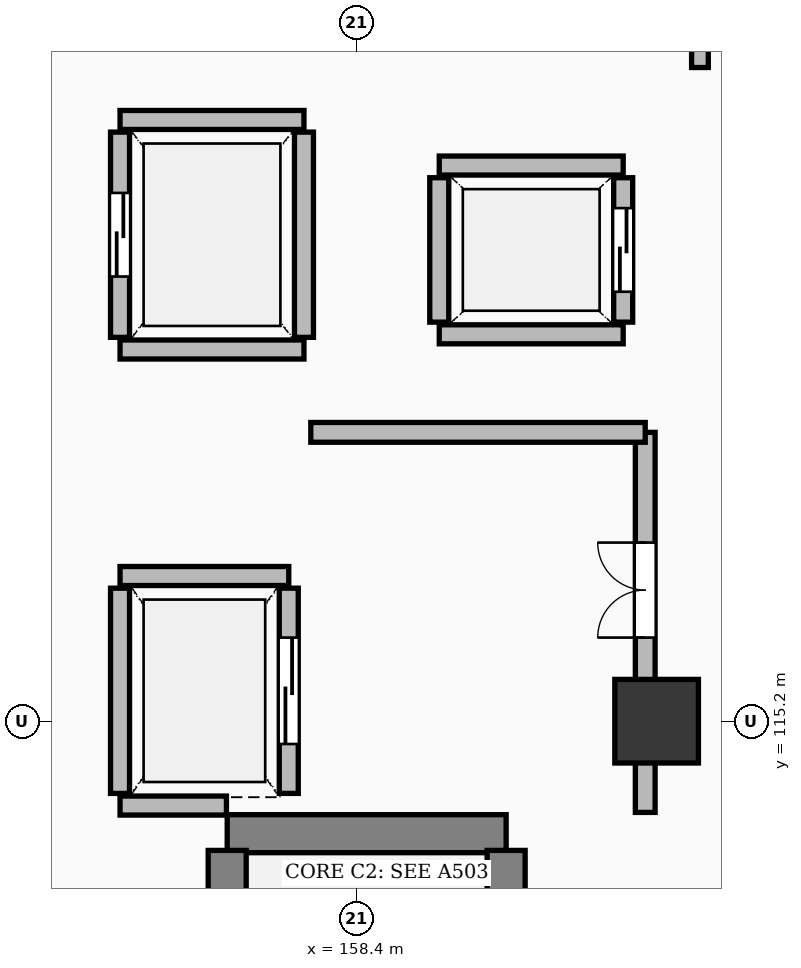
"""IFC4 building model, lengths in metres.
Left out: names, types, materials, properties, quantities, classifications, styles, units other than length and angle.
Written with IfcOpenShell. Run it as: python <this file> out.ifc"""

import sys

from ifc_helpers import new_model, si_unit, direction, frame, frame_2d, origin, origin_2d, place, context, subcontext, project, spatial, rectangle, extrude, element, fill, save


model = new_model("IFC4")
c1 = context("Model", 3, precision=1e-05, world=origin(), true_north=direction((0.0, 1.0)))
c2 = subcontext(c1, "Body", "Model", "MODEL_VIEW")
j1 = project(units=[si_unit("LENGTHUNIT", "METRE"), si_unit("PLANEANGLEUNIT", "RADIAN")], contexts=[c1])
p1 = place(None, origin())
s1 = spatial("IfcSite", under=j1, at=p1, CompositionType="ELEMENT")
p2 = place(p1, origin())
s2 = spatial("IfcBuilding", under=s1, at=p2, CompositionType="ELEMENT")
p3 = place(p2, frame((0.0, 0.0, -4.2)))
s3 = spatial("IfcBuildingStorey", under=s2, at=p3, CompositionType="ELEMENT", Elevation=-4.2)
p4 = place(p3, frame((162.35, 115.2, 0.0), z_axis=(0.0, 0.0, 1.0), x_axis=(1.0, 0.0, 0.0)))
e1 = element("IfcColumn", 1, at=p4, inside=s3, PredefinedType="COLUMN", context=c2, shape_type="SweptSolid", body=[
    extrude(rectangle(XDim=1.1, YDim=1.1, at=origin_2d()), origin(), (0.0, 0.0, 1.0), 4.2),
])
p5 = place(p3, frame((156.7, 113.72, 0.0), z_axis=(0.0, 0.0, 1.0), x_axis=(1.0, 0.0, 0.0)))
e2 = element("IfcWall", 2, at=p5, inside=s3, PredefinedType="SHEAR", context=c2, shape_type="SweptSolid", body=[
    extrude(rectangle(XDim=3.67, YDim=0.5, at=frame_2d((1.835, 0.0))), origin(), (0.0, 0.0, 1.0), 3.78),
])
p6 = place(p3, frame((156.7, 103.0, 0.0), z_axis=(0.0, 0.0, 1.0), x_axis=(0.0, 1.0, 0.0)))
e3 = element("IfcWall", 3, at=p6, inside=s3, PredefinedType="SHEAR", context=c2, shape_type="SweptSolid", body=[
    extrude(rectangle(XDim=10.5, YDim=0.5, at=frame_2d((5.25, 0.0))), origin(), (0.0, 0.0, 1.0), 3.78),
])
p7 = place(p3, frame((160.37, 103.0, 0.0), z_axis=(0.0, 0.0, 1.0), x_axis=(0.0, 1.0, 0.0)))
e4 = element("IfcWall", 4, at=p7, inside=s3, PredefinedType="SHEAR", context=c2, shape_type="SweptSolid", body=[
    extrude(rectangle(XDim=10.5, YDim=0.5, at=frame_2d((5.25, 0.0))), origin(), (0.0, 0.0, 1.0), 3.78),
])
p8 = place(p7, frame((0.45, 0.0, 0.0)))
e5 = element("IfcOpeningElement", 5, at=p8, cuts=e4, PredefinedType="OPENING", context=c2, shape_type="SweptSolid", body=[
    extrude(rectangle(XDim=1.3, YDim=2.15, at=frame_2d((0.65, 1.075))), frame((0.0, 0.262, 0.0), z_axis=(0.0, -1.0, 0.0), x_axis=(1.0, 0.0, 0.0)), (0.0, 0.0, 1.0), 0.524),
])
p9 = place(p3, frame((155.29, 114.09, 0.0), z_axis=(0.0, 0.0, 1.0), x_axis=(1.0, 0.0, 0.0)))
e6 = element("IfcWall", 6, at=p9, inside=s3, PredefinedType="SOLIDWALL", context=c2, shape_type="SweptSolid", body=[
    extrude(rectangle(XDim=1.4, YDim=0.25, at=frame_2d((0.7, 0.0))), origin(), (0.0, 0.0, 1.0), 3.78),
])
p10 = place(p3, frame((155.29, 117.11, 0.0), z_axis=(0.0, 0.0, 1.0), x_axis=(1.0, 0.0, 0.0)))
e7 = element("IfcWall", 7, at=p10, inside=s3, PredefinedType="SOLIDWALL", context=c2, shape_type="SweptSolid", body=[
    extrude(rectangle(XDim=2.22, YDim=0.25, at=frame_2d((1.11, 0.0))), origin(), (0.0, 0.0, 1.0), 3.78),
])
p11 = place(p3, frame((155.29, 114.25, 0.0), z_axis=(0.0, 0.0, 1.0), x_axis=(0.0, 1.0, 0.0)))
e8 = element("IfcWall", 8, at=p11, inside=s3, PredefinedType="SOLIDWALL", context=c2, shape_type="SweptSolid", body=[
    extrude(rectangle(XDim=2.7, YDim=0.25, at=frame_2d((1.35, 0.0))), origin(), (0.0, 0.0, 1.0), 2.932),
])
p12 = place(p3, frame((157.51, 114.25, 0.0), z_axis=(0.0, 0.0, 1.0), x_axis=(0.0, 1.0, 0.0)))
e9 = element("IfcWall", 9, at=p12, inside=s3, PredefinedType="SOLIDWALL", context=c2, shape_type="SweptSolid", body=[
    extrude(rectangle(XDim=2.7, YDim=0.25, at=frame_2d((1.35, 0.0))), origin(), (0.0, 0.0, 1.0), 2.932),
])
p13 = place(p12, frame((0.65, 0.0, 0.0)))
e10 = element("IfcOpeningElement", 10, at=p13, cuts=e9, PredefinedType="OPENING", context=c2, shape_type="SweptSolid", body=[
    extrude(rectangle(XDim=1.4, YDim=2.3, at=frame_2d((0.7, 1.15))), frame((0.0, 0.137, 0.0), z_axis=(0.0, -1.0, 0.0), x_axis=(1.0, 0.0, 0.0)), (0.0, 0.0, 1.0), 0.274),
])
for number, where, z_axis, x_axis in (
    (11, (159.49, 120.29, 0.0), (0.0, 0.0, 1.0), (1.0, 0.0, 0.0)),
    (12, (159.49, 122.51, 0.0), (0.0, 0.0, 1.0), (1.0, 0.0, 0.0)),
):
    element("IfcWall", number, at=place(p3, frame(where, z_axis=z_axis, x_axis=x_axis)), inside=s3, PredefinedType="SOLIDWALL", context=c2, shape_type="SweptSolid", body=[
        extrude(rectangle(XDim=2.42, YDim=0.25, at=frame_2d((1.21, 0.0))), origin(), (0.0, 0.0, 1.0), 3.78),
    ])
p14 = place(p3, frame((159.49, 120.45, 0.0), z_axis=(0.0, 0.0, 1.0), x_axis=(0.0, 1.0, 0.0)))
e13 = element("IfcWall", 13, at=p14, inside=s3, PredefinedType="SOLIDWALL", context=c2, shape_type="SweptSolid", body=[
    extrude(rectangle(XDim=1.9, YDim=0.25, at=frame_2d((0.95, 0.0))), origin(), (0.0, 0.0, 1.0), 3.78),
])
p15 = place(p3, frame((161.91, 120.45, 0.0), z_axis=(0.0, 0.0, 1.0), x_axis=(0.0, 1.0, 0.0)))
e14 = element("IfcWall", 14, at=p15, inside=s3, PredefinedType="SOLIDWALL", context=c2, shape_type="SweptSolid", body=[
    extrude(rectangle(XDim=1.9, YDim=0.25, at=frame_2d((0.95, 0.0))), origin(), (0.0, 0.0, 1.0), 3.78),
])
p16 = place(p15, frame((0.4, 0.0, 0.0)))
e15 = element("IfcOpeningElement", 15, at=p16, cuts=e14, PredefinedType="OPENING", context=c2, shape_type="SweptSolid", body=[
    extrude(rectangle(XDim=1.1, YDim=2.2, at=frame_2d((0.55, 1.1))), frame((0.0, 0.137, 0.0), z_axis=(0.0, -1.0, 0.0), x_axis=(1.0, 0.0, 0.0)), (0.0, 0.0, 1.0), 0.274),
])
for number, where, z_axis, x_axis in (
    (16, (155.29, 120.09, 0.0), (0.0, 0.0, 1.0), (1.0, 0.0, 0.0)),
    (17, (155.29, 123.11, 0.0), (0.0, 0.0, 1.0), (1.0, 0.0, 0.0)),
):
    element("IfcWall", number, at=place(p3, frame(where, z_axis=z_axis, x_axis=x_axis)), inside=s3, PredefinedType="SOLIDWALL", context=c2, shape_type="SweptSolid", body=[
        extrude(rectangle(XDim=2.42, YDim=0.25, at=frame_2d((1.21, 0.0))), origin(), (0.0, 0.0, 1.0), 3.78),
    ])
p17 = place(p3, frame((155.29, 120.25, 0.0), z_axis=(0.0, 0.0, 1.0), x_axis=(0.0, 1.0, 0.0)))
e18 = element("IfcWall", 18, at=p17, inside=s3, PredefinedType="SOLIDWALL", context=c2, shape_type="SweptSolid", body=[
    extrude(rectangle(XDim=2.7, YDim=0.25, at=frame_2d((1.35, 0.0))), origin(), (0.0, 0.0, 1.0), 3.78),
])
p18 = place(p17, frame((0.8, 0.0, 0.0)))
e19 = element("IfcOpeningElement", 19, at=p18, cuts=e18, PredefinedType="OPENING", context=c2, shape_type="SweptSolid", body=[
    extrude(rectangle(XDim=1.1, YDim=2.2, at=frame_2d((0.55, 1.1))), frame((0.0, 0.137, 0.0), z_axis=(0.0, -1.0, 0.0), x_axis=(1.0, 0.0, 0.0)), (0.0, 0.0, 1.0), 0.274),
])
p19 = place(p3, frame((157.71, 120.25, 0.0), z_axis=(0.0, 0.0, 1.0), x_axis=(0.0, 1.0, 0.0)))
e20 = element("IfcWall", 20, at=p19, inside=s3, PredefinedType="SOLIDWALL", context=c2, shape_type="SweptSolid", body=[
    extrude(rectangle(XDim=2.7, YDim=0.25, at=frame_2d((1.35, 0.0))), origin(), (0.0, 0.0, 1.0), 3.78),
])
p20 = place(p3, frame((162.2, 114.0, 0.0), z_axis=(0.0, 0.0, 1.0), x_axis=(0.0, 1.0, 0.0)))
e21 = element("IfcWall", 21, at=p20, inside=s3, PredefinedType="SOLIDWALL", context=c2, shape_type="SweptSolid", body=[
    extrude(rectangle(XDim=5.0, YDim=0.26, at=frame_2d((2.5, 0.0))), origin(), (0.0, 0.0, 1.0), 2.932),
])
p21 = place(p20, frame((2.3, 0.0, 0.0)))
e22 = element("IfcOpeningElement", 22, at=p21, cuts=e21, PredefinedType="OPENING", context=c2, shape_type="SweptSolid", body=[
    extrude(rectangle(XDim=1.25, YDim=2.15, at=frame_2d((0.625, 1.075))), frame((0.0, 0.142, 0.0), z_axis=(0.0, -1.0, 0.0), x_axis=(1.0, 0.0, 0.0)), (0.0, 0.0, 1.0), 0.284),
])
p22 = place(p3, frame((157.8, 119.0, 0.0), z_axis=(0.0, 0.0, 1.0), x_axis=(1.0, 0.0, 0.0)))
e23 = element("IfcWall", 23, at=p22, inside=s3, PredefinedType="SOLIDWALL", context=c2, shape_type="SweptSolid", body=[
    extrude(rectangle(XDim=4.4, YDim=0.26, at=frame_2d((2.2, 0.0))), origin(), (0.0, 0.0, 1.0), 2.932),
])
p23 = place(p3, frame((162.92, 123.8, 0.0), z_axis=(0.0, 0.0, 1.0), x_axis=(0.0, 1.0, 0.0)))
e24 = element("IfcWall", 24, at=p23, inside=s3, PredefinedType="PARTITIONING", context=c2, shape_type="SweptSolid", body=[
    extrude(rectangle(XDim=1.85, YDim=0.22, at=frame_2d((0.925, 0.0))), origin(), (0.0, 0.0, 1.0), 3.022),
])
p24 = place(p13, origin())
e25 = element("IfcDoor", 25, at=p24, inside=s3, OperationType="SLIDING_TO_LEFT", PredefinedType="DOOR", context=c2, shape_type="SweptSolid", body=[
    extrude(rectangle(XDim=1.4, YDim=2.3, at=frame_2d((0.7, 1.15))), frame((0.0, 0.025, 0.0), z_axis=(0.0, -1.0, 0.0), x_axis=(1.0, 0.0, 0.0)), (0.0, 0.0, 1.0), 0.05),
])
fill(e10, e25)
p25 = place(p16, origin())
e26 = element("IfcDoor", 26, at=p25, inside=s3, OperationType="SLIDING_TO_LEFT", PredefinedType="DOOR", context=c2, shape_type="SweptSolid", body=[
    extrude(rectangle(XDim=1.1, YDim=2.2, at=frame_2d((0.55, 1.1))), frame((0.0, 0.025, 0.0), z_axis=(0.0, -1.0, 0.0), x_axis=(1.0, 0.0, 0.0)), (0.0, 0.0, 1.0), 0.05),
])
fill(e15, e26)
p26 = place(p18, origin())
e27 = element("IfcDoor", 27, at=p26, inside=s3, OperationType="SLIDING_TO_LEFT", PredefinedType="DOOR", context=c2, shape_type="SweptSolid", body=[
    extrude(rectangle(XDim=1.1, YDim=2.2, at=frame_2d((0.55, 1.1))), frame((0.0, 0.025, 0.0), z_axis=(0.0, -1.0, 0.0), x_axis=(1.0, 0.0, 0.0)), (0.0, 0.0, 1.0), 0.05),
])
fill(e19, e27)
p27 = place(p21, origin())
e28 = element("IfcDoor", 28, at=p27, inside=s3, OperationType="DOUBLE_DOOR_SINGLE_SWING", PredefinedType="DOOR", context=c2, shape_type="SweptSolid", body=[
    extrude(rectangle(XDim=1.25, YDim=2.15, at=frame_2d((0.625, 1.075))), frame((0.0, 0.025, 0.0), z_axis=(0.0, -1.0, 0.0), x_axis=(1.0, 0.0, 0.0)), (0.0, 0.0, 1.0), 0.05),
])
fill(e22, e28)
save(model, sys.argv[1])
